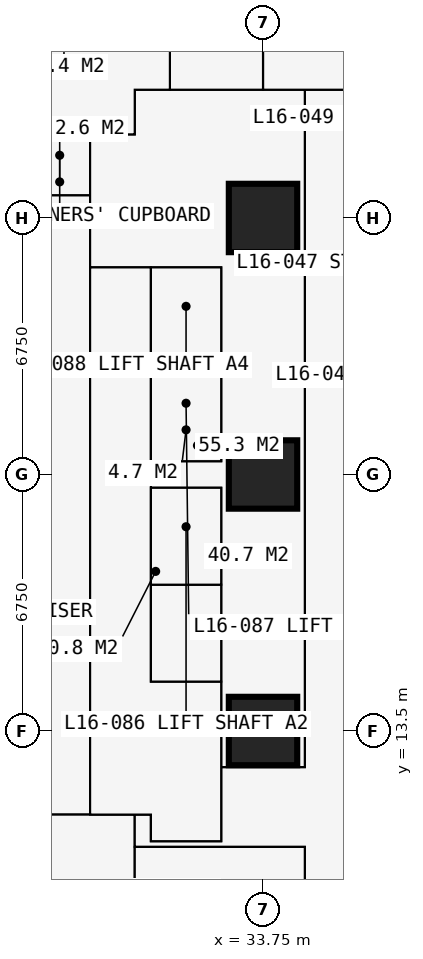
"""IFC4 building model, lengths in metres.
Left out: names, types, materials, properties, quantities, classifications, styles, units other than length and angle.
Written with IfcOpenShell. Run it as: python <this file> out.ifc"""

import sys

from ifc_helpers import new_model, si_unit, direction, frame, frame_2d, origin, origin_2d, place, context, subcontext, project, spatial, rectangle, extrude, element, fill, save


model = new_model("IFC4")
c1 = context("Model", 3, precision=1e-05, world=origin(), true_north=direction((0.0, 1.0)))
c2 = subcontext(c1, "Body", "Model", "MODEL_VIEW")
j1 = project(units=[si_unit("LENGTHUNIT", "METRE"), si_unit("PLANEANGLEUNIT", "RADIAN")], contexts=[c1])
p1 = place(None, origin())
s1 = spatial("IfcSite", under=j1, at=p1, CompositionType="ELEMENT")
p2 = place(p1, origin())
s2 = spatial("IfcBuilding", under=s1, at=p2, CompositionType="ELEMENT")
p3 = place(p2, frame((0.0, 0.0, 61.2)))
s3 = spatial("IfcBuildingStorey", under=s2, at=p3, CompositionType="ELEMENT", Elevation=61.2)
for number, where, z_axis, x_axis in (
    (1, (33.75, 13.5, 0.0), (0.0, 0.0, 1.0), (1.0, 0.0, 0.0)),
    (2, (33.75, 20.25, 0.0), (0.0, 0.0, 1.0), (1.0, 0.0, 0.0)),
    (3, (33.75, 27.0, 0.0), (0.0, 0.0, 1.0), (1.0, 0.0, 0.0)),
):
    element("IfcColumn", number, at=place(p3, frame(where, z_axis=z_axis, x_axis=x_axis)), inside=s3, PredefinedType="COLUMN", context=c2, shape_type="SweptSolid", body=[
        extrude(rectangle(XDim=1.8, YDim=1.8, at=origin_2d()), origin(), (0.0, 0.0, 1.0), 3.6),
    ])
p4 = place(p3, frame((10.125, 11.3, 0.0), z_axis=(0.0, 0.0, 1.0), x_axis=(1.0, 0.0, 0.0)))
e4 = element("IfcWall", 4, at=p4, inside=s3, PredefinedType="PARTITIONING", context=c2, shape_type="SweptSolid", body=[
    extrude(rectangle(XDim=20.675, YDim=0.15, at=frame_2d((10.337, 0.0))), origin(), (0.0, 0.0, 1.0), 3.375),
])
p5 = place(p4, frame((5.2, 0.0, 0.0)))
e5 = element("IfcOpeningElement", 5, at=p5, cuts=e4, PredefinedType="OPENING", context=c2, shape_type="SweptSolid", body=[
    extrude(rectangle(XDim=1.0, YDim=2.2, at=frame_2d((0.5, 1.1))), frame((0.0, 0.085, 0.0), z_axis=(0.0, -1.0, 0.0), x_axis=(1.0, 0.0, 0.0)), (0.0, 0.0, 1.0), 0.17),
])
p6 = place(p4, frame((11.312, 0.0, 0.0)))
e6 = element("IfcOpeningElement", 6, at=p6, cuts=e4, PredefinedType="OPENING", context=c2, shape_type="SweptSolid", body=[
    extrude(rectangle(XDim=1.0, YDim=2.2, at=frame_2d((0.5, 1.1))), frame((0.0, 0.085, 0.0), z_axis=(0.0, -1.0, 0.0), x_axis=(1.0, 0.0, 0.0)), (0.0, 0.0, 1.0), 0.17),
])
p7 = place(p4, frame((2.425, 0.0, 0.0)))
e7 = element("IfcOpeningElement", 7, at=p7, cuts=e4, PredefinedType="OPENING", context=c2, shape_type="SweptSolid", body=[
    extrude(rectangle(XDim=0.95, YDim=2.2, at=frame_2d((0.475, 1.1))), frame((0.0, 0.085, 0.0), z_axis=(0.0, -1.0, 0.0), x_axis=(1.0, 0.0, 0.0)), (0.0, 0.0, 1.0), 0.17),
])
p8 = place(p3, frame((11.3, 29.2, 0.0), z_axis=(0.0, 0.0, 1.0), x_axis=(1.0, 0.0, 0.0)))
e8 = element("IfcWall", 8, at=p8, inside=s3, PredefinedType="PARTITIONING", context=c2, shape_type="SweptSolid", body=[
    extrude(rectangle(XDim=19.075, YDim=0.15, at=frame_2d((9.538, 0.0))), origin(), (0.0, 0.0, 1.0), 3.375),
])
p9 = place(p8, frame((12.875, 0.0, 0.0)))
e9 = element("IfcOpeningElement", 9, at=p9, cuts=e8, PredefinedType="OPENING", context=c2, shape_type="SweptSolid", body=[
    extrude(rectangle(XDim=1.0, YDim=2.2, at=frame_2d((0.5, 1.1))), frame((0.0, 0.085, 0.0), z_axis=(0.0, -1.0, 0.0), x_axis=(1.0, 0.0, 0.0)), (0.0, 0.0, 1.0), 0.17),
])
p10 = place(p8, frame((10.438, 0.0, 0.0)))
e10 = element("IfcOpeningElement", 10, at=p10, cuts=e8, PredefinedType="OPENING", context=c2, shape_type="SweptSolid", body=[
    extrude(rectangle(XDim=1.0, YDim=2.2, at=frame_2d((0.5, 1.1))), frame((0.0, 0.085, 0.0), z_axis=(0.0, -1.0, 0.0), x_axis=(1.0, 0.0, 0.0)), (0.0, 0.0, 1.0), 0.17),
])
p11 = place(p8, frame((14.875, 0.0, 0.0)))
e11 = element("IfcOpeningElement", 11, at=p11, cuts=e8, PredefinedType="OPENING", context=c2, shape_type="SweptSolid", body=[
    extrude(rectangle(XDim=0.95, YDim=2.2, at=frame_2d((0.475, 1.1))), frame((0.0, 0.085, 0.0), z_axis=(0.0, -1.0, 0.0), x_axis=(1.0, 0.0, 0.0)), (0.0, 0.0, 1.0), 0.17),
])
p12 = place(p3, frame((27.6, 27.6, 0.0), z_axis=(0.0, 0.0, 1.0), x_axis=(1.0, 0.0, 0.0)))
e12 = element("IfcWall", 12, at=p12, inside=s3, PredefinedType="PARTITIONING", context=c2, shape_type="SweptSolid", body=[
    extrude(rectangle(XDim=1.6, YDim=0.15, at=frame_2d((0.8, 0.0))), origin(), (0.0, 0.0, 1.0), 2.877),
])
p13 = place(p3, frame((29.2, 11.3, 0.0), z_axis=(0.0, 0.0, 1.0), x_axis=(0.0, 1.0, 0.0)))
e13 = element("IfcWall", 13, at=p13, inside=s3, PredefinedType="PARTITIONING", context=c2, shape_type="SweptSolid", body=[
    extrude(rectangle(XDim=17.9, YDim=0.2, at=frame_2d((8.95, 0.0))), origin(), (0.0, 0.0, 1.0), 3.375),
])
p14 = place(p13, frame((8.35, 0.0, 0.0)))
e14 = element("IfcOpeningElement", 14, at=p14, cuts=e13, PredefinedType="OPENING", context=c2, shape_type="SweptSolid", body=[
    extrude(rectangle(XDim=1.2, YDim=2.2, at=frame_2d((0.6, 1.1))), frame((0.0, 0.11, 0.0), z_axis=(0.0, -1.0, 0.0), x_axis=(1.0, 0.0, 0.0)), (0.0, 0.0, 1.0), 0.22),
])
p15 = place(p3, frame((29.2, 25.7, 0.0), z_axis=(0.0, 0.0, 1.0), x_axis=(1.0, 0.0, 0.0)))
e15 = element("IfcWall", 15, at=p15, inside=s3, PredefinedType="SHEAR", context=c2, shape_type="SweptSolid", body=[
    extrude(rectangle(XDim=3.45, YDim=0.1, at=frame_2d((1.725, 0.0))), origin(), (0.0, 0.0, 1.0), 3.375),
])
p16 = place(p3, frame((30.375, -0.734, 0.0), z_axis=(0.0, 0.0, 1.0), x_axis=(0.0, 1.0, 0.0)))
e16 = element("IfcWall", 16, at=p16, inside=s3, PredefinedType="PARTITIONING", context=c2, shape_type="SweptSolid", body=[
    extrude(rectangle(XDim=12.034, YDim=0.15, at=frame_2d((6.017, 0.0))), origin(), (0.0, 0.0, 1.0), 3.375),
])
p17 = place(p16, frame((5.134, 0.0, 0.0)))
e17 = element("IfcOpeningElement", 17, at=p17, cuts=e16, PredefinedType="OPENING", context=c2, shape_type="SweptSolid", body=[
    extrude(rectangle(XDim=1.0, YDim=2.2, at=frame_2d((0.5, 1.1))), frame((0.0, 0.085, 0.0), z_axis=(0.0, -1.0, 0.0), x_axis=(1.0, 0.0, 0.0)), (0.0, 0.0, 1.0), 0.17),
])
p18 = place(p3, frame((30.375, 10.45, 0.0), z_axis=(0.0, 0.0, 1.0), x_axis=(1.0, 0.0, 0.0)))
e18 = element("IfcWall", 18, at=p18, inside=s3, PredefinedType="PARTITIONING", context=c2, shape_type="SweptSolid", body=[
    extrude(rectangle(XDim=4.475, YDim=0.15, at=frame_2d((2.238, 0.0))), origin(), (0.0, 0.0, 1.0), 3.375),
])
p19 = place(p18, frame((2.35, 0.0, 0.0)))
e19 = element("IfcOpeningElement", 19, at=p19, cuts=e18, PredefinedType="OPENING", context=c2, shape_type="SweptSolid", body=[
    extrude(rectangle(XDim=0.95, YDim=2.2, at=frame_2d((0.475, 1.1))), frame((0.0, 0.085, 0.0), z_axis=(0.0, -1.0, 0.0), x_axis=(1.0, 0.0, 0.0)), (0.0, 0.0, 1.0), 0.17),
])
p20 = place(p3, frame((30.375, 29.2, 0.0), z_axis=(0.0, 0.0, 1.0), x_axis=(0.0, 1.0, 0.0)))
e20 = element("IfcWall", 20, at=p20, inside=s3, PredefinedType="PARTITIONING", context=c2, shape_type="SweptSolid", body=[
    extrude(rectangle(XDim=1.175, YDim=0.15, at=frame_2d((0.587, 0.0))), origin(), (0.0, 0.0, 1.0), 3.375),
])
p21 = place(p3, frame((30.375, 30.375, 0.0), z_axis=(0.0, 0.0, 1.0), x_axis=(1.0, 0.0, 0.0)))
e21 = element("IfcWall", 21, at=p21, inside=s3, PredefinedType="PARTITIONING", context=c2, shape_type="SweptSolid", body=[
    extrude(rectangle(XDim=10.859, YDim=0.15, at=frame_2d((5.429, 0.0))), origin(), (0.0, 0.0, 1.0), 3.375),
])
p22 = place(p3, frame((30.8, 10.6, 0.0), z_axis=(0.0, 0.0, 1.0), x_axis=(0.0, 1.0, 0.0)))
e22 = element("IfcWall", 22, at=p22, inside=s3, PredefinedType="PARTITIONING", context=c2, shape_type="SweptSolid", body=[
    extrude(rectangle(XDim=0.7, YDim=0.15, at=frame_2d((0.35, 0.0))), origin(), (0.0, 0.0, 1.0), 3.375),
])
p23 = place(p3, frame((30.8, 10.6, 0.0), z_axis=(0.0, 0.0, 1.0), x_axis=(1.0, 0.0, 0.0)))
e23 = element("IfcWall", 23, at=p23, inside=s3, PredefinedType="PARTITIONING", context=c2, shape_type="SweptSolid", body=[
    extrude(rectangle(XDim=1.85, YDim=0.15, at=frame_2d((0.925, 0.0))), origin(), (0.0, 0.0, 1.0), 3.375),
])
p24 = place(p3, frame((30.8, 14.8, 0.0), z_axis=(0.0, 0.0, 1.0), x_axis=(0.0, 1.0, 0.0)))
e24 = element("IfcWall", 24, at=p24, inside=s3, PredefinedType="PARTITIONING", context=c2, shape_type="SweptSolid", body=[
    extrude(rectangle(XDim=10.9, YDim=0.15, at=frame_2d((5.45, 0.0))), origin(), (0.0, 0.0, 1.0), 3.375),
])
p25 = place(p24, frame((0.75, 0.0, 0.0)))
e25 = element("IfcOpeningElement", 25, at=p25, cuts=e24, PredefinedType="OPENING", context=c2, shape_type="SweptSolid", body=[
    extrude(rectangle(XDim=1.1, YDim=2.2, at=frame_2d((0.55, 1.1))), frame((0.0, 0.085, 0.0), z_axis=(0.0, -1.0, 0.0), x_axis=(1.0, 0.0, 0.0)), (0.0, 0.0, 1.0), 0.17),
])
p26 = place(p24, frame((3.25, 0.0, 0.0)))
e26 = element("IfcOpeningElement", 26, at=p26, cuts=e24, PredefinedType="OPENING", context=c2, shape_type="SweptSolid", body=[
    extrude(rectangle(XDim=1.1, YDim=2.2, at=frame_2d((0.55, 1.1))), frame((0.0, 0.085, 0.0), z_axis=(0.0, -1.0, 0.0), x_axis=(1.0, 0.0, 0.0)), (0.0, 0.0, 1.0), 0.17),
])
p27 = place(p24, frame((6.5, 0.0, 0.0)))
e27 = element("IfcOpeningElement", 27, at=p27, cuts=e24, PredefinedType="OPENING", context=c2, shape_type="SweptSolid", body=[
    extrude(rectangle(XDim=1.1, YDim=2.2, at=frame_2d((0.55, 1.1))), frame((0.0, 0.085, 0.0), z_axis=(0.0, -1.0, 0.0), x_axis=(1.0, 0.0, 0.0)), (0.0, 0.0, 1.0), 0.17),
])
p28 = place(p24, frame((9.05, 0.0, 0.0)))
e28 = element("IfcOpeningElement", 28, at=p28, cuts=e24, PredefinedType="OPENING", context=c2, shape_type="SweptSolid", body=[
    extrude(rectangle(XDim=1.1, YDim=2.2, at=frame_2d((0.55, 1.1))), frame((0.0, 0.085, 0.0), z_axis=(0.0, -1.0, 0.0), x_axis=(1.0, 0.0, 0.0)), (0.0, 0.0, 1.0), 0.17),
])
for number, where, z_axis, x_axis in (
    (29, (30.8, 14.8, 0.0), (0.0, 0.0, 1.0), (1.0, 0.0, 0.0)),
    (30, (30.8, 17.35, 0.0), (0.0, 0.0, 1.0), (1.0, 0.0, 0.0)),
    (31, (30.8, 19.9, 0.0), (0.0, 0.0, 1.0), (1.0, 0.0, 0.0)),
    (32, (30.8, 20.6, 0.0), (0.0, 0.0, 1.0), (1.0, 0.0, 0.0)),
    (33, (30.8, 23.15, 0.0), (0.0, 0.0, 1.0), (1.0, 0.0, 0.0)),
):
    element("IfcWall", number, at=place(p3, frame(where, z_axis=z_axis, x_axis=x_axis)), inside=s3, PredefinedType="SHEAR", context=c2, shape_type="SweptSolid", body=[
        extrude(rectangle(XDim=1.85, YDim=0.1, at=frame_2d((0.925, 0.0))), origin(), (0.0, 0.0, 1.0), 3.375),
    ])
p29 = place(p3, frame((31.3, 30.375, 0.0), z_axis=(0.0, 0.0, 1.0), x_axis=(0.0, 1.0, 0.0)))
e34 = element("IfcWall", 34, at=p29, inside=s3, PredefinedType="PARTITIONING", context=c2, shape_type="SweptSolid", body=[
    extrude(rectangle(XDim=4.475, YDim=0.15, at=frame_2d((2.238, 0.0))), origin(), (0.0, 0.0, 1.0), 3.375),
])
p30 = place(p3, frame((32.65, 10.6, 0.0), z_axis=(0.0, 0.0, 1.0), x_axis=(0.0, 1.0, 0.0)))
e35 = element("IfcWall", 35, at=p30, inside=s3, PredefinedType="SHEAR", context=c2, shape_type="SweptSolid", body=[
    extrude(rectangle(XDim=9.3, YDim=0.1, at=frame_2d((4.65, 0.0))), origin(), (0.0, 0.0, 1.0), 3.375),
])
p31 = place(p30, frame((0.5, 0.0, 0.0)))
e36 = element("IfcOpeningElement", 36, at=p31, cuts=e35, PredefinedType="OPENING", context=c2, shape_type="SweptSolid", body=[
    extrude(rectangle(XDim=1.0, YDim=2.2, at=frame_2d((0.5, 1.1))), frame((0.0, 0.06, 0.0), z_axis=(0.0, -1.0, 0.0), x_axis=(1.0, 0.0, 0.0)), (0.0, 0.0, 1.0), 0.12),
])
p32 = place(p3, frame((32.65, 12.55, 0.0), z_axis=(0.0, 0.0, 1.0), x_axis=(1.0, 0.0, 0.0)))
e37 = element("IfcWall", 37, at=p32, inside=s3, PredefinedType="PARTITIONING", context=c2, shape_type="SweptSolid", body=[
    extrude(rectangle(XDim=2.2, YDim=0.15, at=frame_2d((1.1, 0.0))), origin(), (0.0, 0.0, 1.0), 3.375),
])
p33 = place(p3, frame((32.65, 20.6, 0.0), z_axis=(0.0, 0.0, 1.0), x_axis=(0.0, 1.0, 0.0)))
e38 = element("IfcWall", 38, at=p33, inside=s3, PredefinedType="PARTITIONING", context=c2, shape_type="SweptSolid", body=[
    extrude(rectangle(XDim=5.1, YDim=0.15, at=frame_2d((2.55, 0.0))), origin(), (0.0, 0.0, 1.0), 3.375),
])
p34 = place(p3, frame((33.75, 30.375, 0.0), z_axis=(0.0, 0.0, 1.0), x_axis=(0.0, 1.0, 0.0)))
e39 = element("IfcWall", 39, at=p34, inside=s3, PredefinedType="PARTITIONING", context=c2, shape_type="SweptSolid", body=[
    extrude(rectangle(XDim=10.859, YDim=0.15, at=frame_2d((5.429, 0.0))), origin(), (0.0, 0.0, 1.0), 2.877),
])
p35 = place(p34, frame((1.45, 0.0, 0.0)))
e40 = element("IfcOpeningElement", 40, at=p35, cuts=e39, PredefinedType="OPENING", context=c2, shape_type="SweptSolid", body=[
    extrude(rectangle(XDim=1.0, YDim=2.2, at=frame_2d((0.5, 1.1))), frame((0.0, 0.085, 0.0), z_axis=(0.0, -1.0, 0.0), x_axis=(1.0, 0.0, 0.0)), (0.0, 0.0, 1.0), 0.17),
])
p36 = place(p3, frame((34.85, 6.75, 0.0), z_axis=(0.0, 0.0, 1.0), x_axis=(0.0, 1.0, 0.0)))
e41 = element("IfcWall", 41, at=p36, inside=s3, PredefinedType="PARTITIONING", context=c2, shape_type="SweptSolid", body=[
    extrude(rectangle(XDim=3.7, YDim=0.15, at=frame_2d((1.85, 0.0))), origin(), (0.0, 0.0, 1.0), 3.375),
])
p37 = place(p3, frame((34.85, 12.55, 0.0), z_axis=(0.0, 0.0, 1.0), x_axis=(0.0, 1.0, 0.0)))
e42 = element("IfcWall", 42, at=p37, inside=s3, PredefinedType="PARTITIONING", context=c2, shape_type="SweptSolid", body=[
    extrude(rectangle(XDim=17.825, YDim=0.15, at=frame_2d((8.913, 0.0))), origin(), (0.0, 0.0, 1.0), 3.375),
])
p38 = place(p37, frame((8.6, 0.0, 0.0)))
e43 = element("IfcOpeningElement", 43, at=p38, cuts=e42, PredefinedType="OPENING", context=c2, shape_type="SweptSolid", body=[
    extrude(rectangle(XDim=0.95, YDim=2.2, at=frame_2d((0.475, 1.1))), frame((0.0, 0.085, 0.0), z_axis=(0.0, -1.0, 0.0), x_axis=(1.0, 0.0, 0.0)), (0.0, 0.0, 1.0), 0.17),
])
p39 = place(p31, origin())
e44 = element("IfcDoor", 44, at=p39, inside=s3, OperationType="SINGLE_SWING_LEFT", PredefinedType="DOOR", context=c2, shape_type="SweptSolid", body=[
    extrude(rectangle(XDim=1.0, YDim=2.2, at=frame_2d((0.5, 1.1))), frame((0.0, 0.025, 0.0), z_axis=(0.0, -1.0, 0.0), x_axis=(1.0, 0.0, 0.0)), (0.0, 0.0, 1.0), 0.05),
])
fill(e36, e44)
p40 = place(p38, origin())
e45 = element("IfcDoor", 45, at=p40, inside=s3, OperationType="SINGLE_SWING_LEFT", PredefinedType="DOOR", context=c2, shape_type="SweptSolid", body=[
    extrude(rectangle(XDim=0.95, YDim=2.2, at=frame_2d((0.475, 1.1))), frame((0.0, 0.025, 0.0), z_axis=(0.0, -1.0, 0.0), x_axis=(1.0, 0.0, 0.0)), (0.0, 0.0, 1.0), 0.05),
])
fill(e43, e45)
p41 = place(p19, origin())
e46 = element("IfcDoor", 46, at=p41, inside=s3, OperationType="SINGLE_SWING_LEFT", PredefinedType="DOOR", context=c2, shape_type="SweptSolid", body=[
    extrude(rectangle(XDim=0.95, YDim=2.2, at=frame_2d((0.475, 1.1))), frame((0.0, 0.025, 0.0), z_axis=(0.0, -1.0, 0.0), x_axis=(1.0, 0.0, 0.0)), (0.0, 0.0, 1.0), 0.05),
])
fill(e19, e46)
p42 = place(p25, origin())
e47 = element("IfcDoor", 47, at=p42, inside=s3, OperationType="DOUBLE_DOOR_SLIDING", PredefinedType="DOOR", context=c2, shape_type="SweptSolid", body=[
    extrude(rectangle(XDim=1.1, YDim=2.2, at=frame_2d((0.55, 1.1))), frame((0.0, 0.025, 0.0), z_axis=(0.0, -1.0, 0.0), x_axis=(1.0, 0.0, 0.0)), (0.0, 0.0, 1.0), 0.05),
])
fill(e25, e47)
p43 = place(p26, origin())
e48 = element("IfcDoor", 48, at=p43, inside=s3, OperationType="DOUBLE_DOOR_SLIDING", PredefinedType="DOOR", context=c2, shape_type="SweptSolid", body=[
    extrude(rectangle(XDim=1.1, YDim=2.2, at=frame_2d((0.55, 1.1))), frame((0.0, 0.025, 0.0), z_axis=(0.0, -1.0, 0.0), x_axis=(1.0, 0.0, 0.0)), (0.0, 0.0, 1.0), 0.05),
])
fill(e26, e48)
p44 = place(p27, origin())
e49 = element("IfcDoor", 49, at=p44, inside=s3, OperationType="DOUBLE_DOOR_SLIDING", PredefinedType="DOOR", context=c2, shape_type="SweptSolid", body=[
    extrude(rectangle(XDim=1.1, YDim=2.2, at=frame_2d((0.55, 1.1))), frame((0.0, 0.025, 0.0), z_axis=(0.0, -1.0, 0.0), x_axis=(1.0, 0.0, 0.0)), (0.0, 0.0, 1.0), 0.05),
])
fill(e27, e49)
p45 = place(p28, origin())
e50 = element("IfcDoor", 50, at=p45, inside=s3, OperationType="DOUBLE_DOOR_SLIDING", PredefinedType="DOOR", context=c2, shape_type="SweptSolid", body=[
    extrude(rectangle(XDim=1.1, YDim=2.2, at=frame_2d((0.55, 1.1))), frame((0.0, 0.025, 0.0), z_axis=(0.0, -1.0, 0.0), x_axis=(1.0, 0.0, 0.0)), (0.0, 0.0, 1.0), 0.05),
])
fill(e28, e50)
p46 = place(p14, origin())
e51 = element("IfcDoor", 51, at=p46, inside=s3, OperationType="DOUBLE_DOOR_SINGLE_SWING", PredefinedType="DOOR", context=c2, shape_type="SweptSolid", body=[
    extrude(rectangle(XDim=1.2, YDim=2.2, at=frame_2d((0.6, 1.1))), frame((0.0, 0.025, 0.0), z_axis=(0.0, -1.0, 0.0), x_axis=(1.0, 0.0, 0.0)), (0.0, 0.0, 1.0), 0.05),
])
fill(e14, e51)
save(model, sys.argv[1])
